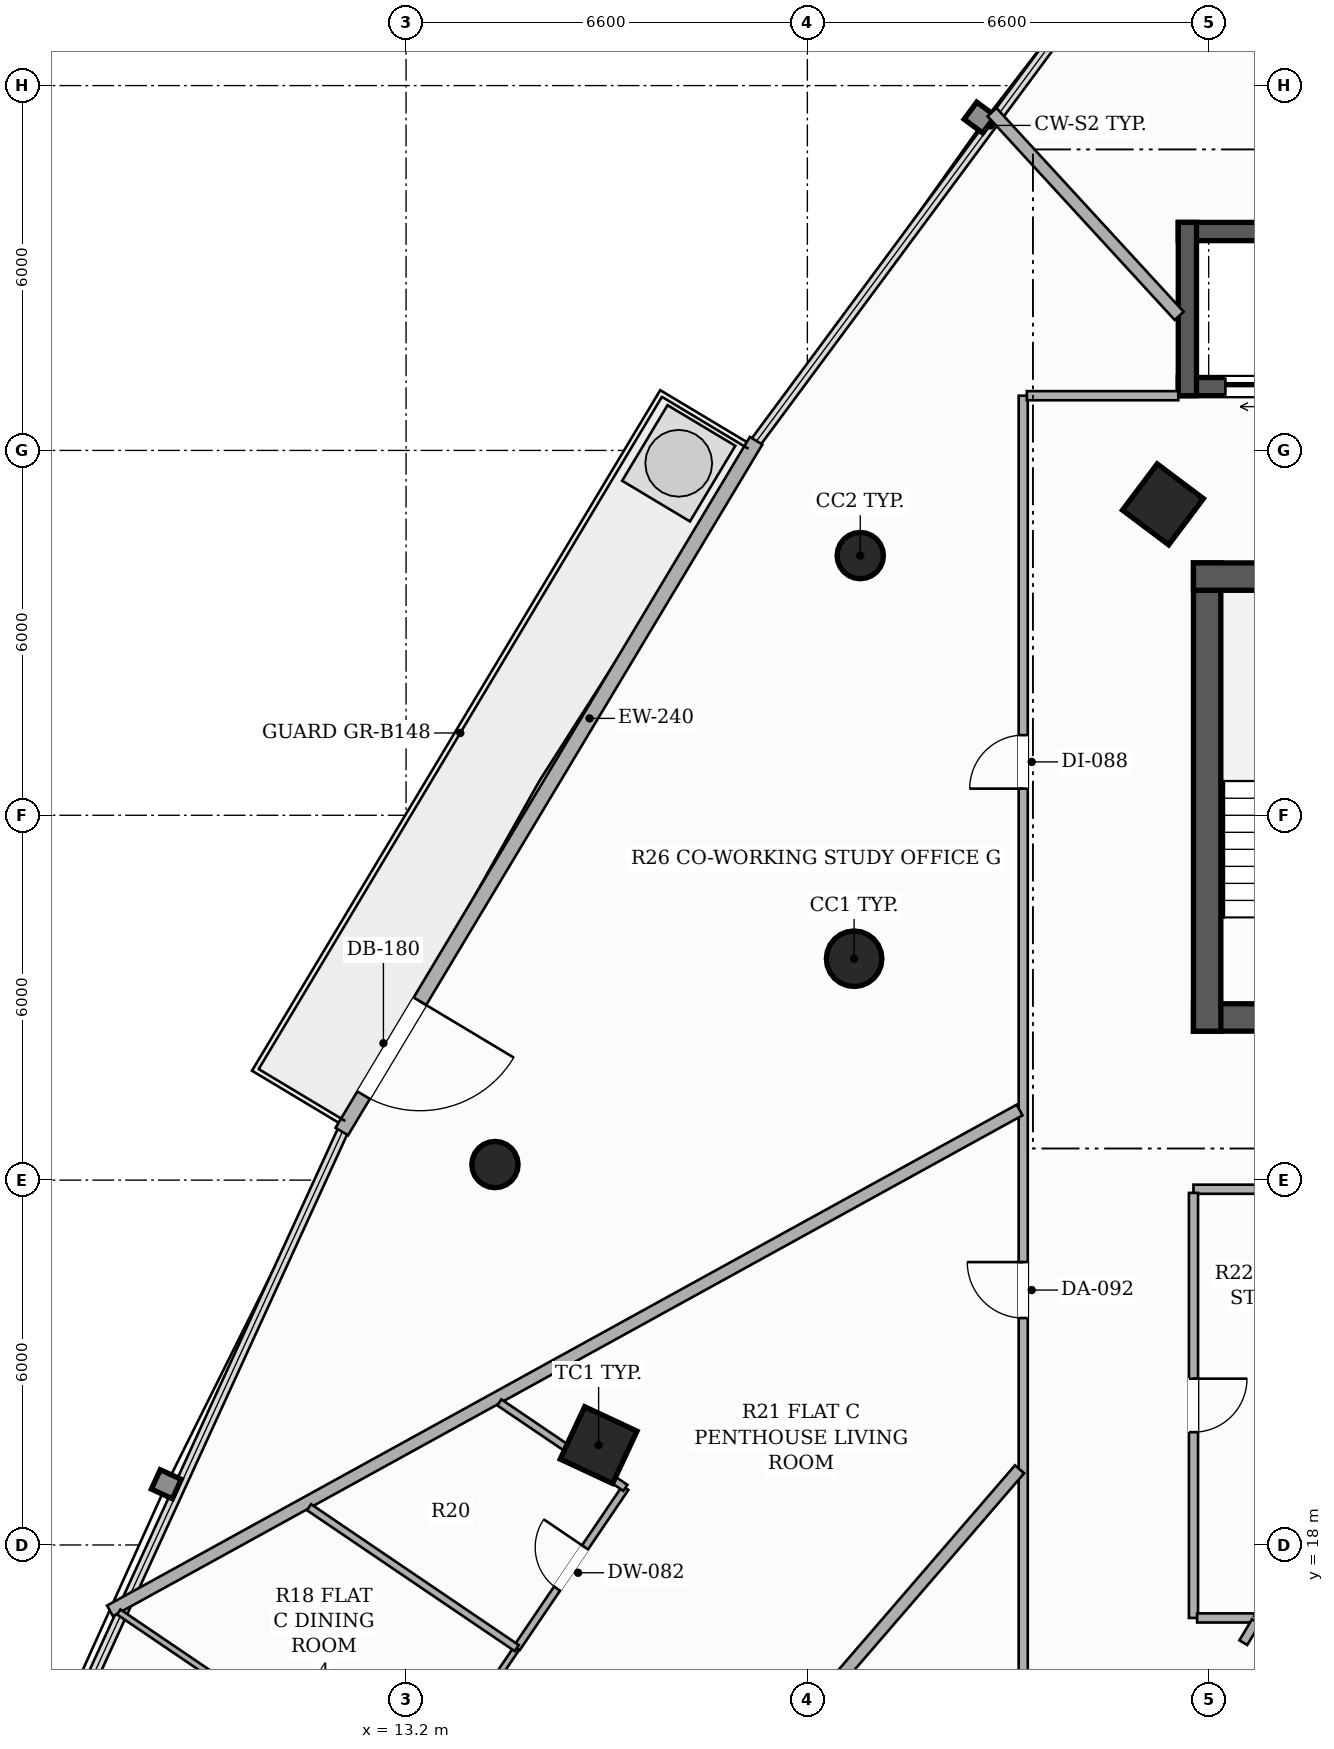
"""IFC4 building model, lengths in metres.
Left out: names, types, materials, properties, quantities, classifications, styles, units other than length and angle.
Written with IfcOpenShell. Run it as: python <this file> out.ifc"""

import sys

from ifc_helpers import new_model, si_unit, direction, frame, frame_2d, origin, origin_2d, place, context, subcontext, project, spatial, rectangle, hollow_rectangle, hollow_circle, extrude, element, fill, save


model = new_model("IFC4")
c1 = context("Model", 3, precision=1e-05, world=origin(), true_north=direction((0.0, 1.0)))
c2 = subcontext(c1, "Body", "Model", "MODEL_VIEW")
j1 = project(units=[si_unit("LENGTHUNIT", "METRE"), si_unit("PLANEANGLEUNIT", "RADIAN")], contexts=[c1])
p1 = place(None, origin())
s1 = spatial("IfcSite", under=j1, at=p1, CompositionType="ELEMENT")
p2 = place(p1, origin())
s2 = spatial("IfcBuilding", under=s1, at=p2, CompositionType="ELEMENT")
p3 = place(p2, frame((0.0, 0.0, 30.2)))
s3 = spatial("IfcBuildingStorey", under=s2, at=p3, CompositionType="ELEMENT", Elevation=30.2)
p4 = place(p3, frame((26.15, 26.675, 0.0), z_axis=(0.0, 0.0, 1.0), x_axis=(1.0, 0.0, 0.0)))
e1 = element("IfcWall", 1, at=p4, inside=s3, PredefinedType="SHEAR", context=c2, shape_type="SweptSolid", body=[
    extrude(rectangle(XDim=13.7, YDim=0.45, at=frame_2d((6.85, 0.0))), origin(), (0.0, 0.0, 1.0), 3.3),
])
p5 = place(p4, frame((4.35, 0.0, 0.0)))
e2 = element("IfcOpeningElement", 2, at=p5, cuts=e1, PredefinedType="OPENING", context=c2, shape_type="SweptSolid", body=[
    extrude(rectangle(XDim=1.05, YDim=2.15, at=frame_2d((0.525, 1.075))), frame((0.0, 0.235, 0.0), z_axis=(0.0, -1.0, 0.0), x_axis=(1.0, 0.0, 0.0)), (0.0, 0.0, 1.0), 0.47),
])
p6 = place(p4, frame((8.3, 0.0, 0.0)))
e3 = element("IfcOpeningElement", 3, at=p6, cuts=e1, PredefinedType="OPENING", context=c2, shape_type="SweptSolid", body=[
    extrude(rectangle(XDim=1.05, YDim=2.15, at=frame_2d((0.525, 1.075))), frame((0.0, 0.235, 0.0), z_axis=(0.0, -1.0, 0.0), x_axis=(1.0, 0.0, 0.0)), (0.0, 0.0, 1.0), 0.47),
])
p7 = place(p3, frame((26.375, 26.45, 0.0), z_axis=(0.0, 0.0, 1.0), x_axis=(0.0, 1.0, 0.0)))
e4 = element("IfcWall", 4, at=p7, inside=s3, PredefinedType="SHEAR", context=c2, shape_type="SweptSolid", body=[
    extrude(rectangle(XDim=7.7, YDim=0.45, at=frame_2d((3.85, 0.0))), origin(), (0.0, 0.0, 1.0), 3.3),
])
p8 = place(p3, frame((26.15, 33.925, 0.0), z_axis=(0.0, 0.0, 1.0), x_axis=(1.0, 0.0, 0.0)))
e5 = element("IfcWall", 5, at=p8, inside=s3, PredefinedType="SHEAR", context=c2, shape_type="SweptSolid", body=[
    extrude(rectangle(XDim=3.75, YDim=0.45, at=frame_2d((1.875, 0.0))), origin(), (0.0, 0.0, 1.0), 3.3),
])
p9 = place(p3, frame((40.1, 37.05, 0.0), z_axis=(0.0, 0.0, 1.0), x_axis=(-1.0, 0.0, 0.0)))
e6 = element("IfcWall", 6, at=p9, inside=s3, PredefinedType="SHEAR", context=c2, shape_type="SweptSolid", body=[
    extrude(rectangle(XDim=14.2, YDim=0.3, at=frame_2d((7.1, 0.0))), origin(), (0.0, 0.0, 1.0), 3.3),
])
p10 = place(p9, frame((12.325, 0.0, 0.0)))
e7 = element("IfcOpeningElement", 7, at=p10, cuts=e6, PredefinedType="OPENING", context=c2, shape_type="SweptSolid", body=[
    extrude(rectangle(XDim=1.1, YDim=2.2, at=frame_2d((0.55, 1.1))), frame((0.0, 0.16, 0.0), z_axis=(0.0, -1.0, 0.0), x_axis=(1.0, 0.0, 0.0)), (0.0, 0.0, 1.0), 0.32),
])
p11 = place(p9, frame((0.775, 0.0, 0.0)))
e8 = element("IfcOpeningElement", 8, at=p11, cuts=e6, PredefinedType="OPENING", context=c2, shape_type="SweptSolid", body=[
    extrude(rectangle(XDim=1.1, YDim=2.2, at=frame_2d((0.55, 1.1))), frame((0.0, 0.16, 0.0), z_axis=(0.0, -1.0, 0.0), x_axis=(1.0, 0.0, 0.0)), (0.0, 0.0, 1.0), 0.32),
])
p12 = place(p3, frame((25.9, 39.6, 0.0), z_axis=(0.0, 0.0, 1.0), x_axis=(1.0, 0.0, 0.0)))
e9 = element("IfcWall", 9, at=p12, inside=s3, PredefinedType="SHEAR", context=c2, shape_type="SweptSolid", body=[
    extrude(rectangle(XDim=14.2, YDim=0.3, at=frame_2d((7.1, 0.0))), origin(), (0.0, 0.0, 1.0), 3.3),
])
p13 = place(p3, frame((26.05, 36.9, 0.0), z_axis=(0.0, 0.0, 1.0), x_axis=(0.0, 1.0, 0.0)))
e10 = element("IfcWall", 10, at=p13, inside=s3, PredefinedType="SHEAR", context=c2, shape_type="SweptSolid", body=[
    extrude(rectangle(XDim=2.85, YDim=0.3, at=frame_2d((1.425, 0.0))), origin(), (0.0, 0.0, 1.0), 3.3),
])
p14 = place(p3, frame((25.648, 35.113, 0.0), z_axis=(0.0, 0.0, 1.0), x_axis=(0.600420225326, 0.799684658487, 0.0)))
e11 = element("IfcColumn", 11, at=p14, inside=s3, PredefinedType="COLUMN", context=c2, shape_type="SweptSolid", body=[
    extrude(hollow_rectangle(XDim=0.95, YDim=0.95, WallThickness=0.032, at=origin_2d()), origin(), (0.0, 0.0, 1.0), 3.3),
])
p15 = place(p3, frame((20.569, 27.641, 0.0), z_axis=(0.0, 0.0, 1.0), x_axis=(1.0, 0.0, 0.0)))
e12 = element("IfcColumn", 12, at=p15, inside=s3, PredefinedType="COLUMN", context=c2, shape_type="SweptSolid", body=[
    extrude(hollow_circle(Radius=0.457, WallThickness=0.025, at=origin_2d()), origin(), (0.0, 0.0, 1.0), 3.3),
])
p16 = place(p3, frame((16.367, 19.642, 0.0), z_axis=(0.0, 0.0, 1.0), x_axis=(0.422618261741, 0.906307787037, 0.0)))
e13 = element("IfcColumn", 13, at=p16, inside=s3, PredefinedType="COLUMN", context=c2, shape_type="SweptSolid", body=[
    extrude(hollow_rectangle(XDim=0.95, YDim=0.95, WallThickness=0.032, at=origin_2d()), origin(), (0.0, 0.0, 1.0), 3.3),
])
for number, where, z_axis, x_axis in (
    (14, (20.67, 34.271, 0.0), (0.0, 0.0, 1.0), (1.0, 0.0, 0.0)),
    (15, (14.662, 24.256, 0.0), (0.0, 0.0, 1.0), (1.0, 0.0, 0.0)),
):
    element("IfcColumn", number, at=place(p3, frame(where, z_axis=z_axis, x_axis=x_axis)), inside=s3, PredefinedType="COLUMN", context=c2, shape_type="SweptSolid", body=[
        extrude(hollow_circle(Radius=0.381, WallThickness=0.022, at=origin_2d()), origin(), (0.0, 0.0, 1.0), 3.3),
    ])
p17 = place(p3, frame((18.957, 36.16, 0.0), z_axis=(0.0, 0.0, 1.0), x_axis=(-0.51435482044, -0.857577470955, 0.0)))
e16 = element("IfcWall", 16, at=p17, inside=s3, PredefinedType="SOLIDWALL", context=c2, shape_type="SweptSolid", body=[
    extrude(rectangle(XDim=13.248, YDim=0.24, at=frame_2d((6.624, 0.0))), origin(), (0.0, 0.0, 1.0), 2.624),
])
p18 = place(p17, frame((10.75, 0.0, 0.0)))
e17 = element("IfcOpeningElement", 17, at=p18, cuts=e16, PredefinedType="OPENING", context=c2, shape_type="SweptSolid", body=[
    extrude(rectangle(XDim=1.8, YDim=2.2, at=frame_2d((0.9, 1.1))), frame((0.0, 0.13, 0.0), z_axis=(0.0, -1.0, 0.0), x_axis=(1.0, 0.0, 0.0)), (0.0, 0.0, 1.0), 0.26),
])
p19 = place(p3, frame((23.35, 11.86, 0.0), z_axis=(0.0, 0.0, 1.0), x_axis=(0.0, 1.0, 0.0)))
e18 = element("IfcWall", 18, at=p19, inside=s3, PredefinedType="PARTITIONING", context=c2, shape_type="SweptSolid", body=[
    extrude(rectangle(XDim=25.04, YDim=0.15, at=frame_2d((12.52, 0.0))), origin(), (0.0, 0.0, 1.0), 2.413),
])
p20 = place(p19, frame((9.872, 0.0, 0.0)))
e19 = element("IfcOpeningElement", 19, at=p20, cuts=e18, PredefinedType="OPENING", context=c2, shape_type="SweptSolid", body=[
    extrude(rectangle(XDim=0.92, YDim=2.15, at=frame_2d((0.46, 1.075))), frame((0.0, 0.085, 0.0), z_axis=(0.0, -1.0, 0.0), x_axis=(1.0, 0.0, 0.0)), (0.0, 0.0, 1.0), 0.17),
])
p21 = place(p19, frame((18.578, 0.0, 0.0)))
e20 = element("IfcOpeningElement", 20, at=p21, cuts=e18, PredefinedType="OPENING", context=c2, shape_type="SweptSolid", body=[
    extrude(rectangle(XDim=0.88, YDim=2.1, at=frame_2d((0.44, 1.05))), frame((0.0, 0.085, 0.0), z_axis=(0.0, -1.0, 0.0), x_axis=(1.0, 0.0, 0.0)), (0.0, 0.0, 1.0), 0.17),
])
p22 = place(p3, frame((23.41, 36.9, 0.0), z_axis=(0.0, 0.0, 1.0), x_axis=(1.0, 0.0, 0.0)))
e21 = element("IfcWall", 21, at=p22, inside=s3, PredefinedType="PARTITIONING", context=c2, shape_type="SweptSolid", body=[
    extrude(rectangle(XDim=2.49, YDim=0.15, at=frame_2d((1.245, 0.0))), origin(), (0.0, 0.0, 1.0), 2.413),
])
p23 = place(p3, frame((31.523, 23.85, 0.0), z_axis=(0.0, 0.0, 1.0), x_axis=(-1.0, 0.0, 0.0)))
e22 = element("IfcWall", 22, at=p23, inside=s3, PredefinedType="PARTITIONING", context=c2, shape_type="SweptSolid", body=[
    extrude(rectangle(XDim=5.373, YDim=0.15, at=frame_2d((2.687, 0.0))), origin(), (0.0, 0.0, 1.0), 2.669),
])
p24 = place(p3, frame((26.15, 23.79, 0.0), z_axis=(0.0, 0.0, 1.0), x_axis=(0.0, -1.0, 0.0)))
e23 = element("IfcWall", 23, at=p24, inside=s3, PredefinedType="PARTITIONING", context=c2, shape_type="SweptSolid", body=[
    extrude(rectangle(XDim=6.99, YDim=0.15, at=frame_2d((3.495, 0.0))), origin(), (0.0, 0.0, 1.0), 2.669),
])
p25 = place(p24, frame((3.055, 0.0, 0.0)))
e24 = element("IfcOpeningElement", 24, at=p25, cuts=e23, PredefinedType="OPENING", context=c2, shape_type="SweptSolid", body=[
    extrude(rectangle(XDim=0.88, YDim=2.1, at=frame_2d((0.44, 1.05))), frame((0.0, 0.085, 0.0), z_axis=(0.0, -1.0, 0.0), x_axis=(1.0, 0.0, 0.0)), (0.0, 0.0, 1.0), 0.17),
])
p26 = place(p3, frame((26.21, 16.8, 0.0), z_axis=(0.0, 0.0, 1.0), x_axis=(1.0, 0.0, 0.0)))
e25 = element("IfcWall", 25, at=p26, inside=s3, PredefinedType="PARTITIONING", context=c2, shape_type="SweptSolid", body=[
    extrude(rectangle(XDim=1.003, YDim=0.15, at=frame_2d((0.501, 0.0))), origin(), (0.0, 0.0, 1.0), 3.06),
])
p27 = place(p3, frame((27.177, 16.74, 0.0), z_axis=(0.0, 0.0, 1.0), x_axis=(-0.513515835534, -0.858080116688, 0.0)))
e26 = element("IfcWall", 26, at=p27, inside=s3, PredefinedType="PARTITIONING", context=c2, shape_type="SweptSolid", body=[
    extrude(rectangle(XDim=0.403, YDim=0.15, at=frame_2d((0.202, 0.0))), origin(), (0.0, 0.0, 1.0), 3.06),
])
p28 = place(p3, frame((27.213, 16.791, 0.0), z_axis=(0.0, 0.0, 1.0), x_axis=(0.521095914239, 0.853498124288, 0.0)))
e27 = element("IfcWall", 27, at=p28, inside=s3, PredefinedType="PARTITIONING", context=c2, shape_type="SweptSolid", body=[
    extrude(rectangle(XDim=8.2, YDim=0.15, at=frame_2d((4.1, 0.0))), origin(), (0.0, 0.0, 1.0), 2.669),
])
p29 = place(p3, frame((9.24, 2.959, 0.0), z_axis=(0.0, 0.0, 1.0), x_axis=(0.653213734957, 0.757173570896, 0.0)))
e28 = element("IfcWall", 28, at=p29, inside=s3, PredefinedType="PARTITIONING", context=c2, shape_type="SweptSolid", body=[
    extrude(rectangle(XDim=21.509, YDim=0.2, at=frame_2d((10.754, 0.0))), origin(), (0.0, 0.0, 1.0), 2.413),
])
p30 = place(p3, frame((25.915, 38.213, 0.0), z_axis=(0.0, 0.0, 1.0), x_axis=(-0.676584398078, 0.736365094418, 0.0)))
e29 = element("IfcWall", 29, at=p30, inside=s3, PredefinedType="PARTITIONING", context=c2, shape_type="SweptSolid", body=[
    extrude(rectangle(XDim=4.55, YDim=0.2, at=frame_2d((2.275, 0.0))), origin(), (0.0, 0.0, 1.0), 2.619),
])
p31 = place(p3, frame((8.331, 16.916, 0.0), z_axis=(0.0, 0.0, 1.0), x_axis=(0.875977946948, 0.482351154721, 0.0)))
e30 = element("IfcWall", 30, at=p31, inside=s3, PredefinedType="PARTITIONING", context=c2, shape_type="SweptSolid", body=[
    extrude(rectangle(XDim=17.077, YDim=0.2, at=frame_2d((8.539, 0.0))), origin(), (0.0, 0.0, 1.0), 2.413),
])
p32 = place(p3, frame((15.02, 16.304, 0.0), z_axis=(0.0, 0.0, 1.0), x_axis=(0.561248235284, 0.827647520621, 0.0)))
e31 = element("IfcWall", 31, at=p32, inside=s3, PredefinedType="PARTITIONING", context=c2, shape_type="SweptSolid", body=[
    extrude(rectangle(XDim=3.184, YDim=0.12, at=frame_2d((1.592, 0.0))), origin(), (0.0, 0.0, 1.0), 2.669),
])
p33 = place(p32, frame((1.182, 0.0, 0.0)))
e32 = element("IfcOpeningElement", 32, at=p33, cuts=e31, PredefinedType="OPENING", context=c2, shape_type="SweptSolid", body=[
    extrude(rectangle(XDim=0.82, YDim=2.1, at=frame_2d((0.41, 1.05))), frame((0.0, 0.07, 0.0), z_axis=(0.0, -1.0, 0.0), x_axis=(1.0, 0.0, 0.0)), (0.0, 0.0, 1.0), 0.14),
])
p34 = place(p3, frame((16.807, 18.939, 0.0), z_axis=(0.0, 0.0, 1.0), x_axis=(-0.82760029168, 0.561317875372, 0.0)))
e33 = element("IfcWall", 33, at=p34, inside=s3, PredefinedType="PARTITIONING", context=c2, shape_type="SweptSolid", body=[
    extrude(rectangle(XDim=2.505, YDim=0.12, at=frame_2d((1.252, 0.0))), origin(), (0.0, 0.0, 1.0), 2.413),
])
p35 = place(p3, frame((13.233, 13.67, 0.0), z_axis=(0.0, 0.0, 1.0), x_axis=(0.561443272398, 0.827515227582, 0.0)))
e34 = element("IfcWall", 34, at=p35, inside=s3, PredefinedType="PARTITIONING", context=c2, shape_type="SweptSolid", body=[
    extrude(rectangle(XDim=3.183, YDim=0.1, at=frame_2d((1.592, 0.0))), origin(), (0.0, 0.0, 1.0), 3.06),
])
p36 = place(p35, frame((1.151, 0.0, 0.0)))
e35 = element("IfcOpeningElement", 35, at=p36, cuts=e34, PredefinedType="OPENING", context=c2, shape_type="SweptSolid", body=[
    extrude(rectangle(XDim=0.88, YDim=2.1, at=frame_2d((0.44, 1.05))), frame((0.0, 0.06, 0.0), z_axis=(0.0, -1.0, 0.0), x_axis=(1.0, 0.0, 0.0)), (0.0, 0.0, 1.0), 0.12),
])
p37 = place(p3, frame((15.02, 16.304, 0.0), z_axis=(0.0, 0.0, 1.0), x_axis=(-0.827573908317, 0.561356772715, 0.0)))
e36 = element("IfcWall", 36, at=p37, inside=s3, PredefinedType="PARTITIONING", context=c2, shape_type="SweptSolid", body=[
    extrude(rectangle(XDim=4.128, YDim=0.12, at=frame_2d((2.064, 0.0))), origin(), (0.0, 0.0, 1.0), 2.413),
])
p38 = place(p3, frame((8.475, 16.898, 0.0), z_axis=(0.0, 0.0, 1.0), x_axis=(0.827515231239, -0.561443267007, 0.0)))
e37 = element("IfcWall", 37, at=p38, inside=s3, PredefinedType="PARTITIONING", context=c2, shape_type="SweptSolid", body=[
    extrude(rectangle(XDim=5.75, YDim=0.1, at=frame_2d((2.875, 0.0))), origin(), (0.0, 0.0, 1.0), 2.413),
])
p39 = place(p18, origin())
e38 = element("IfcDoor", 38, at=p39, inside=s3, OperationType="SINGLE_SWING_LEFT", PredefinedType="DOOR", context=c2, shape_type="SweptSolid", body=[
    extrude(rectangle(XDim=1.8, YDim=2.2, at=frame_2d((0.9, 1.1))), frame((0.0, 0.025, 0.0), z_axis=(0.0, -1.0, 0.0), x_axis=(1.0, 0.0, 0.0)), (0.0, 0.0, 1.0), 0.05),
])
fill(e17, e38)
p40 = place(p10, origin())
e39 = element("IfcDoor", 39, at=p40, inside=s3, OperationType="DOUBLE_DOOR_SLIDING", PredefinedType="DOOR", context=c2, shape_type="SweptSolid", body=[
    extrude(rectangle(XDim=1.1, YDim=2.2, at=frame_2d((0.55, 1.1))), frame((0.0, 0.025, 0.0), z_axis=(0.0, -1.0, 0.0), x_axis=(1.0, 0.0, 0.0)), (0.0, 0.0, 1.0), 0.05),
])
fill(e7, e39)
p41 = place(p20, origin())
e40 = element("IfcDoor", 40, at=p41, inside=s3, OperationType="SINGLE_SWING_RIGHT", PredefinedType="DOOR", context=c2, shape_type="SweptSolid", body=[
    extrude(rectangle(XDim=0.92, YDim=2.15, at=frame_2d((0.46, 1.075))), frame((0.0, 0.025, 0.0), z_axis=(0.0, -1.0, 0.0), x_axis=(1.0, 0.0, 0.0)), (0.0, 0.0, 1.0), 0.05),
])
fill(e19, e40)
p42 = place(p33, origin())
e41 = element("IfcDoor", 41, at=p42, inside=s3, OperationType="SINGLE_SWING_RIGHT", PredefinedType="DOOR", context=c2, shape_type="SweptSolid", body=[
    extrude(rectangle(XDim=0.82, YDim=2.1, at=frame_2d((0.41, 1.05))), frame((0.0, 0.025, 0.0), z_axis=(0.0, -1.0, 0.0), x_axis=(1.0, 0.0, 0.0)), (0.0, 0.0, 1.0), 0.05),
])
fill(e32, e41)
p43 = place(p21, origin())
e42 = element("IfcDoor", 42, at=p43, inside=s3, OperationType="SINGLE_SWING_LEFT", PredefinedType="DOOR", context=c2, shape_type="SweptSolid", body=[
    extrude(rectangle(XDim=0.88, YDim=2.1, at=frame_2d((0.44, 1.05))), frame((0.0, 0.025, 0.0), z_axis=(0.0, -1.0, 0.0), x_axis=(1.0, 0.0, 0.0)), (0.0, 0.0, 1.0), 0.05),
])
fill(e20, e42)
p44 = place(p25, origin())
e43 = element("IfcDoor", 43, at=p44, inside=s3, OperationType="SINGLE_SWING_LEFT", PredefinedType="DOOR", context=c2, shape_type="SweptSolid", body=[
    extrude(rectangle(XDim=0.88, YDim=2.1, at=frame_2d((0.44, 1.05))), frame((0.0, 0.025, 0.0), z_axis=(0.0, -1.0, 0.0), x_axis=(1.0, 0.0, 0.0)), (0.0, 0.0, 1.0), 0.05),
])
fill(e24, e43)
save(model, sys.argv[1])
